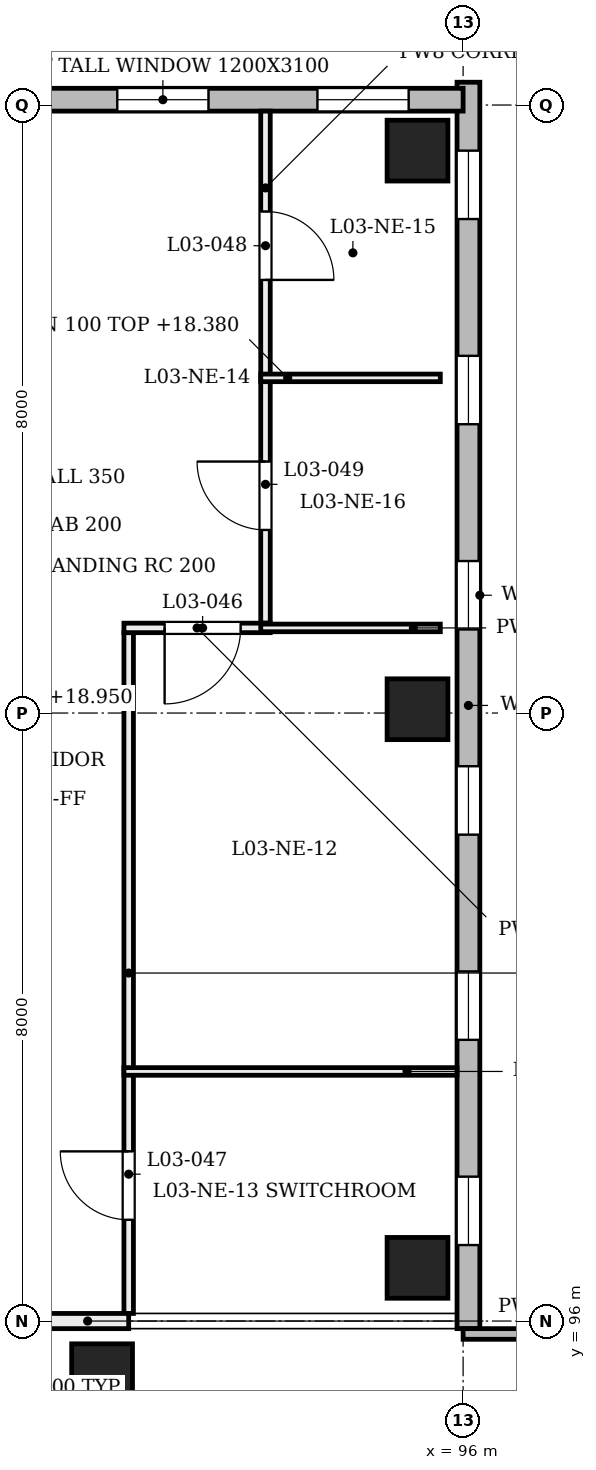
"""IFC4 building model, lengths in metres.
Left out: names, types, materials, properties, quantities, classifications, styles, units other than length and angle.
Written with IfcOpenShell. Run it as: python <this file> out.ifc"""

import sys

from ifc_helpers import new_model, si_unit, direction, frame, frame_2d, origin, origin_2d, place, context, subcontext, project, spatial, rectangle, extrude, element, fill, save


model = new_model("IFC4")
c1 = context("Model", 3, precision=1e-05, world=origin(), true_north=direction((0.0, 1.0)))
c2 = subcontext(c1, "Body", "Model", "MODEL_VIEW")
j1 = project(units=[si_unit("LENGTHUNIT", "METRE"), si_unit("PLANEANGLEUNIT", "RADIAN")], contexts=[c1])
p1 = place(None, origin())
s1 = spatial("IfcSite", under=j1, at=p1, CompositionType="ELEMENT")
p2 = place(p1, origin())
s2 = spatial("IfcBuilding", under=s1, at=p2, CompositionType="ELEMENT")
p3 = place(p2, frame((0.0, 0.0, 14.4)))
s3 = spatial("IfcBuildingStorey", under=s2, at=p3, CompositionType="ELEMENT", Elevation=14.4)
for number, where, z_axis, x_axis in (
    (1, (95.4, 96.7, 0.0), (0.0, 0.0, 1.0), (1.0, 0.0, 0.0)),
    (2, (95.4, 104.05, 0.0), (0.0, 0.0, 1.0), (1.0, 0.0, 0.0)),
    (3, (95.4, 111.4, 0.0), (0.0, 0.0, 1.0), (1.0, 0.0, 0.0)),
):
    element("IfcColumn", number, at=place(p3, frame(where, z_axis=z_axis, x_axis=x_axis)), inside=s3, PredefinedType="COLUMN", context=c2, shape_type="SweptSolid", body=[
        extrude(rectangle(XDim=0.8, YDim=0.8, at=origin_2d()), origin(), (0.0, 0.0, 1.0), 4.8),
    ])
p4 = place(p3, frame((91.0, 95.3, 0.0), z_axis=(0.203952265704, 0.0, 0.978980833987), x_axis=(0.0, 1.0, 0.0)))
e4 = element("IfcColumn", 4, at=p4, inside=s3, PredefinedType="COLUMN", context=c2, shape_type="SweptSolid", body=[
    extrude(rectangle(XDim=0.8, YDim=0.8, at=origin_2d()), origin(), (0.0, 0.0, 1.0), 4.903),
])
p5 = place(p3, frame((96.07, 95.9, 0.0), z_axis=(0.0, 0.0, 1.0), x_axis=(0.0, 1.0, 0.0)))
e5 = element("IfcWall", 5, at=p5, inside=s3, PredefinedType="SOLIDWALL", context=c2, shape_type="SweptSolid", body=[
    extrude(rectangle(XDim=16.4, YDim=0.3, at=frame_2d((8.2, 0.0))), origin(), (0.0, 0.0, 1.0), 3.9),
])
p6 = place(p5, frame((1.1, 0.0, 0.75)))
e6 = element("IfcOpeningElement", 6, at=p6, cuts=e5, PredefinedType="OPENING", context=c2, shape_type="SweptSolid", body=[
    extrude(rectangle(XDim=0.9, YDim=3.1, at=frame_2d((0.45, 1.55))), frame((0.0, 0.16, 0.0), z_axis=(0.0, -1.0, 0.0), x_axis=(1.0, 0.0, 0.0)), (0.0, 0.0, 1.0), 0.32),
])
p7 = place(p5, frame((3.8, 0.0, 0.75)))
e7 = element("IfcOpeningElement", 7, at=p7, cuts=e5, PredefinedType="OPENING", context=c2, shape_type="SweptSolid", body=[
    extrude(rectangle(XDim=0.9, YDim=3.1, at=frame_2d((0.45, 1.55))), frame((0.0, 0.16, 0.0), z_axis=(0.0, -1.0, 0.0), x_axis=(1.0, 0.0, 0.0)), (0.0, 0.0, 1.0), 0.32),
])
p8 = place(p5, frame((6.5, 0.0, 0.75)))
e8 = element("IfcOpeningElement", 8, at=p8, cuts=e5, PredefinedType="OPENING", context=c2, shape_type="SweptSolid", body=[
    extrude(rectangle(XDim=0.9, YDim=3.1, at=frame_2d((0.45, 1.55))), frame((0.0, 0.16, 0.0), z_axis=(0.0, -1.0, 0.0), x_axis=(1.0, 0.0, 0.0)), (0.0, 0.0, 1.0), 0.32),
])
p9 = place(p5, frame((9.2, 0.0, 0.75)))
e9 = element("IfcOpeningElement", 9, at=p9, cuts=e5, PredefinedType="OPENING", context=c2, shape_type="SweptSolid", body=[
    extrude(rectangle(XDim=0.9, YDim=3.1, at=frame_2d((0.45, 1.55))), frame((0.0, 0.16, 0.0), z_axis=(0.0, -1.0, 0.0), x_axis=(1.0, 0.0, 0.0)), (0.0, 0.0, 1.0), 0.32),
])
p10 = place(p5, frame((11.9, 0.0, 0.75)))
e10 = element("IfcOpeningElement", 10, at=p10, cuts=e5, PredefinedType="OPENING", context=c2, shape_type="SweptSolid", body=[
    extrude(rectangle(XDim=0.9, YDim=3.1, at=frame_2d((0.45, 1.55))), frame((0.0, 0.16, 0.0), z_axis=(0.0, -1.0, 0.0), x_axis=(1.0, 0.0, 0.0)), (0.0, 0.0, 1.0), 0.32),
])
p11 = place(p5, frame((14.6, 0.0, 0.75)))
e11 = element("IfcOpeningElement", 11, at=p11, cuts=e5, PredefinedType="OPENING", context=c2, shape_type="SweptSolid", body=[
    extrude(rectangle(XDim=0.9, YDim=3.1, at=frame_2d((0.45, 1.55))), frame((0.0, 0.16, 0.0), z_axis=(0.0, -1.0, 0.0), x_axis=(1.0, 0.0, 0.0)), (0.0, 0.0, 1.0), 0.32),
])
p12 = place(p3, frame((88.1, 112.07, 0.0), z_axis=(0.0, 0.0, 1.0), x_axis=(1.0, 0.0, 0.0)))
e12 = element("IfcWall", 12, at=p12, inside=s3, PredefinedType="SOLIDWALL", context=c2, shape_type="SweptSolid", body=[
    extrude(rectangle(XDim=7.9, YDim=0.3, at=frame_2d((3.95, 0.0))), origin(), (0.0, 0.0, 1.0), 3.9),
])
p13 = place(p12, frame((0.717, 0.0, 0.75)))
e13 = element("IfcOpeningElement", 13, at=p13, cuts=e12, PredefinedType="OPENING", context=c2, shape_type="SweptSolid", body=[
    extrude(rectangle(XDim=1.2, YDim=3.1, at=frame_2d((0.6, 1.55))), frame((0.0, 0.16, 0.0), z_axis=(0.0, -1.0, 0.0), x_axis=(1.0, 0.0, 0.0)), (0.0, 0.0, 1.0), 0.32),
])
p14 = place(p12, frame((3.35, 0.0, 0.75)))
e14 = element("IfcOpeningElement", 14, at=p14, cuts=e12, PredefinedType="OPENING", context=c2, shape_type="SweptSolid", body=[
    extrude(rectangle(XDim=1.2, YDim=3.1, at=frame_2d((0.6, 1.55))), frame((0.0, 0.16, 0.0), z_axis=(0.0, -1.0, 0.0), x_axis=(1.0, 0.0, 0.0)), (0.0, 0.0, 1.0), 0.32),
])
p15 = place(p12, frame((5.983, 0.0, 0.75)))
e15 = element("IfcOpeningElement", 15, at=p15, cuts=e12, PredefinedType="OPENING", context=c2, shape_type="SweptSolid", body=[
    extrude(rectangle(XDim=1.2, YDim=3.1, at=frame_2d((0.6, 1.55))), frame((0.0, 0.16, 0.0), z_axis=(0.0, -1.0, 0.0), x_axis=(1.0, 0.0, 0.0)), (0.0, 0.0, 1.0), 0.32),
])
p16 = place(p3, frame((96.0, 95.83, 0.0), z_axis=(0.0, 0.0, 1.0), x_axis=(1.0, 0.0, 0.0)))
e16 = element("IfcWall", 16, at=p16, inside=s3, PredefinedType="SOLIDWALL", context=c2, shape_type="SweptSolid", body=[
    extrude(rectangle(XDim=3.0, YDim=0.14, at=frame_2d((1.5, 0.0))), origin(), (0.0, 0.0, 1.0), 3.9),
])
p17 = place(p3, frame((91.6, 96.1, 0.0), z_axis=(0.0, 0.0, 1.0), x_axis=(0.0, 1.0, 0.0)))
e17 = element("IfcWall", 17, at=p17, inside=s3, PredefinedType="PARTITIONING", context=c2, shape_type="SweptSolid", body=[
    extrude(rectangle(XDim=8.958, YDim=0.125, at=frame_2d((4.479, 0.0))), origin(), (0.0, 0.0, 1.0), 3.88),
])
p18 = place(p17, frame((1.233, 0.0, 0.0)))
e18 = element("IfcOpeningElement", 18, at=p18, cuts=e17, PredefinedType="OPENING", context=c2, shape_type="SweptSolid", body=[
    extrude(rectangle(XDim=0.9, YDim=2.1, at=frame_2d((0.45, 1.05))), frame((0.0, 0.073, 0.0), z_axis=(0.0, -1.0, 0.0), x_axis=(1.0, 0.0, 0.0)), (0.0, 0.0, 1.0), 0.145),
])
p19 = place(p3, frame((93.4, 105.183, 0.0), z_axis=(0.0, 0.0, 1.0), x_axis=(0.0, 1.0, 0.0)))
e19 = element("IfcWall", 19, at=p19, inside=s3, PredefinedType="PARTITIONING", context=c2, shape_type="SweptSolid", body=[
    extrude(rectangle(XDim=6.737, YDim=0.125, at=frame_2d((3.369, 0.0))), origin(), (0.0, 0.0, 1.0), 3.88),
])
p20 = place(p19, frame((4.516, 0.0, 0.0)))
e20 = element("IfcOpeningElement", 20, at=p20, cuts=e19, PredefinedType="OPENING", context=c2, shape_type="SweptSolid", body=[
    extrude(rectangle(XDim=0.9, YDim=2.1, at=frame_2d((0.45, 1.05))), frame((0.0, 0.073, 0.0), z_axis=(0.0, -1.0, 0.0), x_axis=(1.0, 0.0, 0.0)), (0.0, 0.0, 1.0), 0.145),
])
p21 = place(p19, frame((1.226, 0.0, 0.0)))
e21 = element("IfcOpeningElement", 21, at=p21, cuts=e19, PredefinedType="OPENING", context=c2, shape_type="SweptSolid", body=[
    extrude(rectangle(XDim=0.9, YDim=2.1, at=frame_2d((0.45, 1.05))), frame((0.0, 0.073, 0.0), z_axis=(0.0, -1.0, 0.0), x_axis=(1.0, 0.0, 0.0)), (0.0, 0.0, 1.0), 0.145),
])
p22 = place(p3, frame((91.538, 99.284, 0.0), z_axis=(0.0, 0.0, 1.0), x_axis=(1.0, 0.0, 0.0)))
e22 = element("IfcWall", 22, at=p22, inside=s3, PredefinedType="PARTITIONING", context=c2, shape_type="SweptSolid", body=[
    extrude(rectangle(XDim=4.382, YDim=0.1, at=frame_2d((2.191, 0.0))), origin(), (0.0, 0.0, 1.0), 3.88),
])
p23 = place(p3, frame((91.538, 105.12, 0.0), z_axis=(0.0, 0.0, 1.0), x_axis=(1.0, 0.0, 0.0)))
e23 = element("IfcWall", 23, at=p23, inside=s3, PredefinedType="PARTITIONING", context=c2, shape_type="SweptSolid", body=[
    extrude(rectangle(XDim=1.925, YDim=0.125, at=frame_2d((0.962, 0.0))), origin(), (0.0, 0.0, 1.0), 4.56),
])
p24 = place(p23, frame((0.535, 0.0, 0.0)))
e24 = element("IfcOpeningElement", 24, at=p24, cuts=e23, PredefinedType="OPENING", context=c2, shape_type="SweptSolid", body=[
    extrude(rectangle(XDim=1.0, YDim=2.1, at=frame_2d((0.5, 1.05))), frame((0.0, 0.073, 0.0), z_axis=(0.0, -1.0, 0.0), x_axis=(1.0, 0.0, 0.0)), (0.0, 0.0, 1.0), 0.145),
])
for number, where, z_axis, x_axis in (
    (25, (93.337, 105.12, 0.0), (0.0, 0.0, 1.0), (1.0, 0.0, 0.0)),
    (26, (93.337, 108.41, 0.0), (0.0, 0.0, 1.0), (1.0, 0.0, 0.0)),
):
    element("IfcWall", number, at=place(p3, frame(where, z_axis=z_axis, x_axis=x_axis)), inside=s3, PredefinedType="PARTITIONING", context=c2, shape_type="SweptSolid", body=[
        extrude(rectangle(XDim=2.363, YDim=0.1, at=frame_2d((1.181, 0.0))), origin(), (0.0, 0.0, 1.0), 3.98),
    ])
p25 = place(p3, frame((88.0, 96.0, 0.0), z_axis=(0.0, 0.0, 1.0), x_axis=(1.0, 0.0, 0.0)))
e27 = element("IfcWall", 27, at=p25, inside=s3, PredefinedType="PARTITIONING", context=c2, shape_type="SweptSolid", body=[
    extrude(rectangle(XDim=3.6, YDim=0.2, at=frame_2d((1.8, 0.0))), origin(), (0.0, 0.0, 1.0), 3.88),
])
p26 = place(p25, frame((1.3, 0.0, 0.0)))
e28 = element("IfcOpeningElement", 28, at=p26, cuts=e27, PredefinedType="OPENING", context=c2, shape_type="SweptSolid", body=[
    extrude(rectangle(XDim=1.0, YDim=2.1, at=frame_2d((0.5, 1.05))), frame((0.0, 0.11, 0.0), z_axis=(0.0, -1.0, 0.0), x_axis=(1.0, 0.0, 0.0)), (0.0, 0.0, 1.0), 0.22),
])
p27 = place(p6, origin())
e29 = element("IfcWindow", 29, at=p27, inside=s3, PartitioningType="SINGLE_PANEL", PredefinedType="WINDOW", context=c2, shape_type="SweptSolid", body=[
    extrude(rectangle(XDim=0.9, YDim=3.1, at=frame_2d((0.45, 1.55))), frame((0.0, 0.03, 0.0), z_axis=(0.0, -1.0, 0.0), x_axis=(1.0, 0.0, 0.0)), (0.0, 0.0, 1.0), 0.06),
])
fill(e6, e29)
p28 = place(p7, origin())
e30 = element("IfcWindow", 30, at=p28, inside=s3, PartitioningType="SINGLE_PANEL", PredefinedType="WINDOW", context=c2, shape_type="SweptSolid", body=[
    extrude(rectangle(XDim=0.9, YDim=3.1, at=frame_2d((0.45, 1.55))), frame((0.0, 0.03, 0.0), z_axis=(0.0, -1.0, 0.0), x_axis=(1.0, 0.0, 0.0)), (0.0, 0.0, 1.0), 0.06),
])
fill(e7, e30)
p29 = place(p8, origin())
e31 = element("IfcWindow", 31, at=p29, inside=s3, PartitioningType="SINGLE_PANEL", PredefinedType="WINDOW", context=c2, shape_type="SweptSolid", body=[
    extrude(rectangle(XDim=0.9, YDim=3.1, at=frame_2d((0.45, 1.55))), frame((0.0, 0.03, 0.0), z_axis=(0.0, -1.0, 0.0), x_axis=(1.0, 0.0, 0.0)), (0.0, 0.0, 1.0), 0.06),
])
fill(e8, e31)
p30 = place(p9, origin())
e32 = element("IfcWindow", 32, at=p30, inside=s3, PartitioningType="SINGLE_PANEL", PredefinedType="WINDOW", context=c2, shape_type="SweptSolid", body=[
    extrude(rectangle(XDim=0.9, YDim=3.1, at=frame_2d((0.45, 1.55))), frame((0.0, 0.03, 0.0), z_axis=(0.0, -1.0, 0.0), x_axis=(1.0, 0.0, 0.0)), (0.0, 0.0, 1.0), 0.06),
])
fill(e9, e32)
p31 = place(p10, origin())
e33 = element("IfcWindow", 33, at=p31, inside=s3, PartitioningType="SINGLE_PANEL", PredefinedType="WINDOW", context=c2, shape_type="SweptSolid", body=[
    extrude(rectangle(XDim=0.9, YDim=3.1, at=frame_2d((0.45, 1.55))), frame((0.0, 0.03, 0.0), z_axis=(0.0, -1.0, 0.0), x_axis=(1.0, 0.0, 0.0)), (0.0, 0.0, 1.0), 0.06),
])
fill(e10, e33)
p32 = place(p11, origin())
e34 = element("IfcWindow", 34, at=p32, inside=s3, PartitioningType="SINGLE_PANEL", PredefinedType="WINDOW", context=c2, shape_type="SweptSolid", body=[
    extrude(rectangle(XDim=0.9, YDim=3.1, at=frame_2d((0.45, 1.55))), frame((0.0, 0.03, 0.0), z_axis=(0.0, -1.0, 0.0), x_axis=(1.0, 0.0, 0.0)), (0.0, 0.0, 1.0), 0.06),
])
fill(e11, e34)
p33 = place(p14, origin())
e35 = element("IfcWindow", 35, at=p33, inside=s3, PartitioningType="SINGLE_PANEL", PredefinedType="WINDOW", context=c2, shape_type="SweptSolid", body=[
    extrude(rectangle(XDim=1.2, YDim=3.1, at=frame_2d((0.6, 1.55))), frame((0.0, 0.03, 0.0), z_axis=(0.0, -1.0, 0.0), x_axis=(1.0, 0.0, 0.0)), (0.0, 0.0, 1.0), 0.06),
])
fill(e14, e35)
p34 = place(p15, origin())
e36 = element("IfcWindow", 36, at=p34, inside=s3, PartitioningType="SINGLE_PANEL", PredefinedType="WINDOW", context=c2, shape_type="SweptSolid", body=[
    extrude(rectangle(XDim=1.2, YDim=3.1, at=frame_2d((0.6, 1.55))), frame((0.0, 0.03, 0.0), z_axis=(0.0, -1.0, 0.0), x_axis=(1.0, 0.0, 0.0)), (0.0, 0.0, 1.0), 0.06),
])
fill(e15, e36)
p35 = place(p24, frame((1.0, 0.0, 0.0), z_axis=(0.0, 0.0, 1.0), x_axis=(-1.0, 0.0, 0.0)))
e37 = element("IfcDoor", 37, at=p35, inside=s3, OperationType="SINGLE_SWING_LEFT", PredefinedType="DOOR", context=c2, shape_type="SweptSolid", body=[
    extrude(rectangle(XDim=1.0, YDim=2.1, at=frame_2d((0.5, 1.05))), frame((0.0, 0.025, 0.0), z_axis=(0.0, -1.0, 0.0), x_axis=(1.0, 0.0, 0.0)), (0.0, 0.0, 1.0), 0.05),
])
fill(e24, e37)
p36 = place(p18, frame((0.9, 0.0, 0.0), z_axis=(0.0, 0.0, 1.0), x_axis=(-1.0, 0.0, 0.0)))
e38 = element("IfcDoor", 38, at=p36, inside=s3, OperationType="SINGLE_SWING_RIGHT", PredefinedType="DOOR", context=c2, shape_type="SweptSolid", body=[
    extrude(rectangle(XDim=0.9, YDim=2.1, at=frame_2d((0.45, 1.05))), frame((0.0, 0.025, 0.0), z_axis=(0.0, -1.0, 0.0), x_axis=(1.0, 0.0, 0.0)), (0.0, 0.0, 1.0), 0.05),
])
fill(e18, e38)
p37 = place(p20, frame((0.9, 0.0, 0.0), z_axis=(0.0, 0.0, 1.0), x_axis=(-1.0, 0.0, 0.0)))
e39 = element("IfcDoor", 39, at=p37, inside=s3, OperationType="SINGLE_SWING_LEFT", PredefinedType="DOOR", context=c2, shape_type="SweptSolid", body=[
    extrude(rectangle(XDim=0.9, YDim=2.1, at=frame_2d((0.45, 1.05))), frame((0.0, 0.025, 0.0), z_axis=(0.0, -1.0, 0.0), x_axis=(1.0, 0.0, 0.0)), (0.0, 0.0, 1.0), 0.05),
])
fill(e20, e39)
p38 = place(p21, frame((0.9, 0.0, 0.0), z_axis=(0.0, 0.0, 1.0), x_axis=(-1.0, 0.0, 0.0)))
e40 = element("IfcDoor", 40, at=p38, inside=s3, OperationType="SINGLE_SWING_RIGHT", PredefinedType="DOOR", context=c2, shape_type="SweptSolid", body=[
    extrude(rectangle(XDim=0.9, YDim=2.1, at=frame_2d((0.45, 1.05))), frame((0.0, 0.025, 0.0), z_axis=(0.0, -1.0, 0.0), x_axis=(1.0, 0.0, 0.0)), (0.0, 0.0, 1.0), 0.05),
])
fill(e21, e40)
save(model, sys.argv[1])
